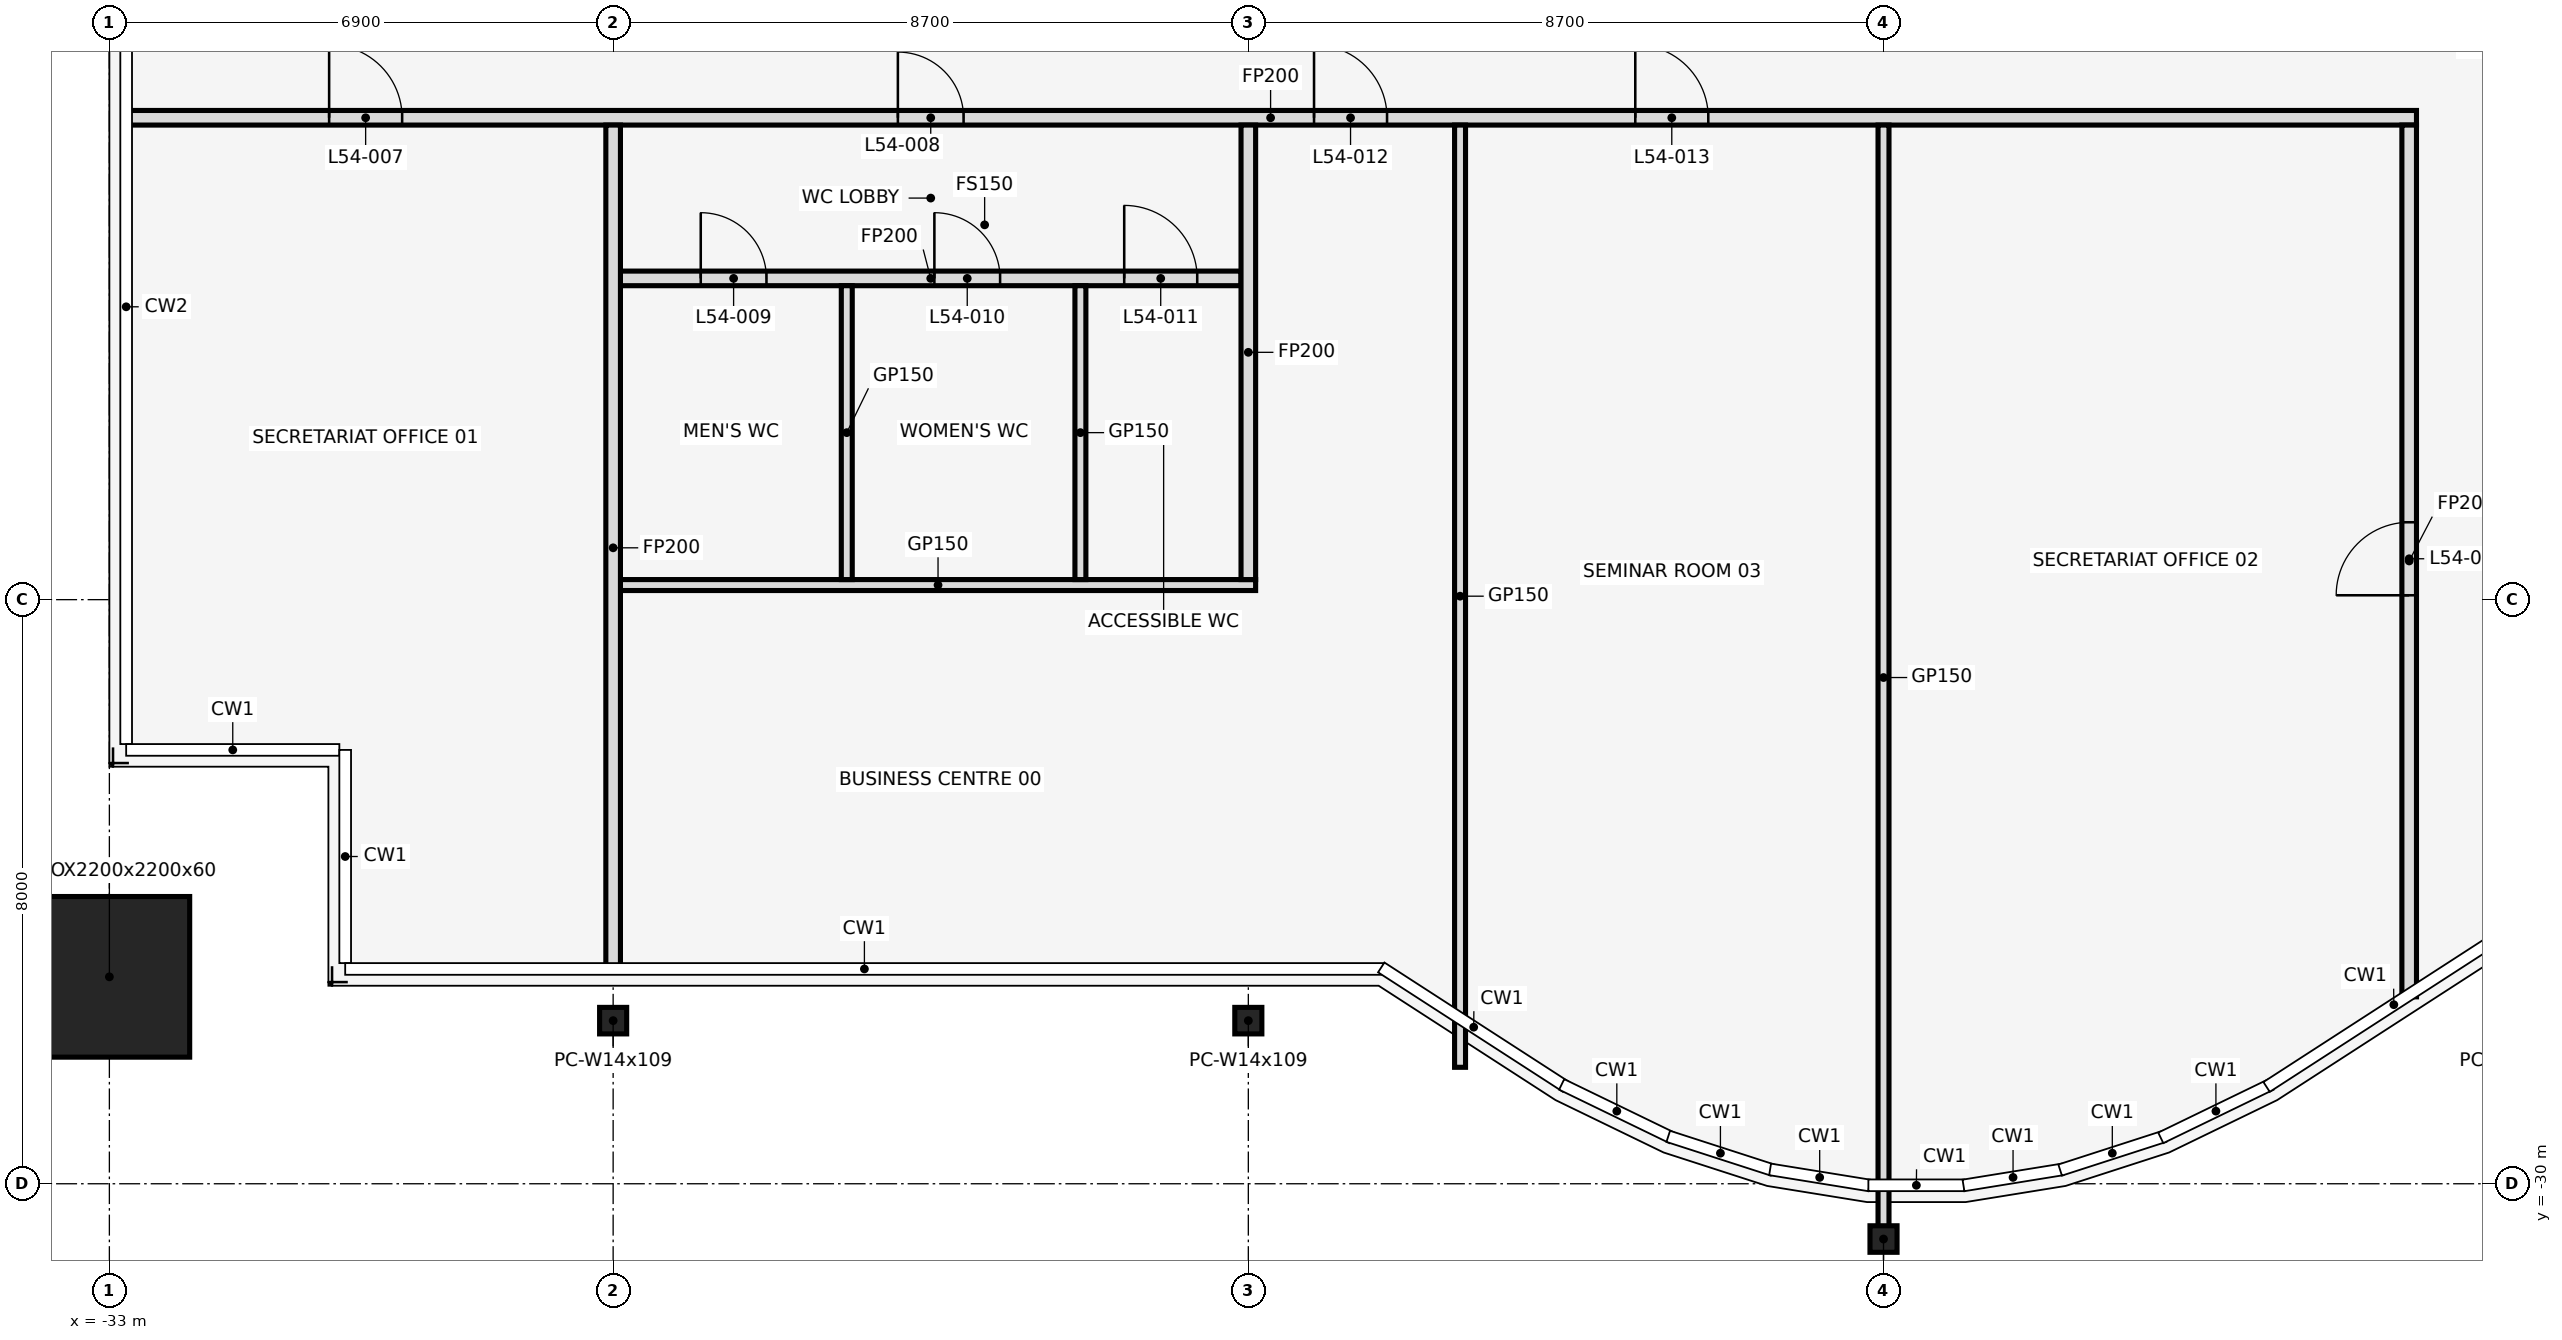
"""IFC4 building model, lengths in metres.
Left out: names, types, materials, properties, quantities, classifications, styles, units other than length and angle.
Written with IfcOpenShell. Run it as: python <this file> out.ifc"""

import sys

from ifc_helpers import new_model, si_unit, direction, frame, frame_2d, origin, origin_2d, place, context, subcontext, project, spatial, rectangle, hollow_rectangle, i_section, extrude, element, fill, save


model = new_model("IFC4")
c1 = context("Model", 3, precision=1e-05, world=origin(), true_north=direction((0.0, 1.0)))
c2 = subcontext(c1, "Body", "Model", "MODEL_VIEW")
j1 = project(units=[si_unit("LENGTHUNIT", "METRE"), si_unit("PLANEANGLEUNIT", "RADIAN")], contexts=[c1])
p1 = place(None, origin())
s1 = spatial("IfcSite", under=j1, at=p1, CompositionType="ELEMENT")
p2 = place(p1, origin())
s2 = spatial("IfcBuilding", under=s1, at=p2, CompositionType="ELEMENT")
p3 = place(p2, frame((0.0, 0.0, 241.4)))
s3 = spatial("IfcBuildingStorey", under=s2, at=p3, CompositionType="ELEMENT", Elevation=241.4)
p4 = place(p3, frame((-33.0, -27.166, 0.0), z_axis=(0.0, 0.0, 1.0), x_axis=(1.0, 0.0, 0.0)))
e1 = element("IfcColumn", 1, at=p4, inside=s3, PredefinedType="COLUMN", context=c2, shape_type="SweptSolid", body=[
    extrude(hollow_rectangle(XDim=2.2, YDim=2.2, WallThickness=0.06, at=origin_2d()), origin(), (0.0, 0.0, 1.0), 4.2),
])
for number, where, z_axis, x_axis in (
    (2, (-26.1, -27.766, 0.0), (0.0, 0.0, 1.0), (1.0, 0.0, 0.0)),
    (3, (-17.4, -27.766, 0.0), (0.0, 0.0, 1.0), (1.0, 0.0, 0.0)),
    (4, (-8.7, -30.757, 0.0), (0.0, 0.0, 1.0), (1.0, 0.0, 0.0)),
):
    element("IfcColumn", number, at=place(p3, frame(where, z_axis=z_axis, x_axis=x_axis)), inside=s3, PredefinedType="COLUMN", context=c2, shape_type="SweptSolid", body=[
        extrude(i_section(OverallWidth=0.371, OverallDepth=0.363, WebThickness=0.013, FlangeThickness=0.022, at=origin_2d()), origin(), (0.0, 0.0, 1.0), 4.2),
    ])
p5 = place(p3, frame((-26.0, -21.8, 0.0), z_axis=(0.0, 0.0, 1.0), x_axis=(1.0, 0.0, 0.0)))
e5 = element("IfcWall", 5, at=p5, inside=s3, PredefinedType="PARTITIONING", context=c2, shape_type="SweptSolid", body=[
    extrude(rectangle(XDim=8.7, YDim=0.15, at=frame_2d((4.35, 0.0))), origin(), (0.0, 0.0, 1.0), 3.118),
])
p6 = place(p3, frame((-26.0, -17.6, 0.0), z_axis=(0.0, 0.0, 1.0), x_axis=(1.0, 0.0, 0.0)))
e6 = element("IfcWall", 6, at=p6, inside=s3, PredefinedType="PARTITIONING", context=c2, shape_type="SweptSolid", body=[
    extrude(rectangle(XDim=8.5, YDim=0.2, at=frame_2d((4.25, 0.0))), origin(), (0.0, 0.0, 1.0), 3.118),
])
p7 = place(p6, frame((1.1, 0.0, 0.0)))
e7 = element("IfcOpeningElement", 7, at=p7, cuts=e6, PredefinedType="OPENING", context=c2, shape_type="SweptSolid", body=[
    extrude(rectangle(XDim=0.9, YDim=2.1, at=frame_2d((0.45, 1.05))), frame((0.0, 0.112, 0.0), z_axis=(0.0, -1.0, 0.0), x_axis=(1.0, 0.0, 0.0)), (0.0, 0.0, 1.0), 0.224),
])
p8 = place(p6, frame((4.3, 0.0, 0.0)))
e8 = element("IfcOpeningElement", 8, at=p8, cuts=e6, PredefinedType="OPENING", context=c2, shape_type="SweptSolid", body=[
    extrude(rectangle(XDim=0.9, YDim=2.1, at=frame_2d((0.45, 1.05))), frame((0.0, 0.112, 0.0), z_axis=(0.0, -1.0, 0.0), x_axis=(1.0, 0.0, 0.0)), (0.0, 0.0, 1.0), 0.224),
])
p9 = place(p6, frame((6.9, 0.0, 0.0)))
e9 = element("IfcOpeningElement", 9, at=p9, cuts=e6, PredefinedType="OPENING", context=c2, shape_type="SweptSolid", body=[
    extrude(rectangle(XDim=1.0, YDim=2.1, at=frame_2d((0.5, 1.05))), frame((0.0, 0.112, 0.0), z_axis=(0.0, -1.0, 0.0), x_axis=(1.0, 0.0, 0.0)), (0.0, 0.0, 1.0), 0.224),
])
p10 = place(p3, frame((-32.79, -15.4, 0.0), z_axis=(0.0, 0.0, 1.0), x_axis=(1.0, 0.0, 0.0)))
e10 = element("IfcWall", 10, at=p10, inside=s3, PredefinedType="PARTITIONING", context=c2, shape_type="SweptSolid", body=[
    extrude(rectangle(XDim=31.39, YDim=0.2, at=frame_2d((15.695, 0.0))), origin(), (0.0, 0.0, 1.0), 3.118),
])
p11 = place(p10, frame((2.8, 0.0, 0.0)))
e11 = element("IfcOpeningElement", 11, at=p11, cuts=e10, PredefinedType="OPENING", context=c2, shape_type="SweptSolid", body=[
    extrude(rectangle(XDim=1.0, YDim=2.1, at=frame_2d((0.5, 1.05))), frame((0.0, 0.112, 0.0), z_axis=(0.0, -1.0, 0.0), x_axis=(1.0, 0.0, 0.0)), (0.0, 0.0, 1.0), 0.224),
])
p12 = place(p10, frame((10.59, 0.0, 0.0)))
e12 = element("IfcOpeningElement", 12, at=p12, cuts=e10, PredefinedType="OPENING", context=c2, shape_type="SweptSolid", body=[
    extrude(rectangle(XDim=0.9, YDim=2.1, at=frame_2d((0.45, 1.05))), frame((0.0, 0.112, 0.0), z_axis=(0.0, -1.0, 0.0), x_axis=(1.0, 0.0, 0.0)), (0.0, 0.0, 1.0), 0.224),
])
p13 = place(p10, frame((16.29, 0.0, 0.0)))
e13 = element("IfcOpeningElement", 13, at=p13, cuts=e10, PredefinedType="OPENING", context=c2, shape_type="SweptSolid", body=[
    extrude(rectangle(XDim=1.0, YDim=2.1, at=frame_2d((0.5, 1.05))), frame((0.0, 0.112, 0.0), z_axis=(0.0, -1.0, 0.0), x_axis=(1.0, 0.0, 0.0)), (0.0, 0.0, 1.0), 0.224),
])
p14 = place(p10, frame((20.69, 0.0, 0.0)))
e14 = element("IfcOpeningElement", 14, at=p14, cuts=e10, PredefinedType="OPENING", context=c2, shape_type="SweptSolid", body=[
    extrude(rectangle(XDim=1.0, YDim=2.1, at=frame_2d((0.5, 1.05))), frame((0.0, 0.112, 0.0), z_axis=(0.0, -1.0, 0.0), x_axis=(1.0, 0.0, 0.0)), (0.0, 0.0, 1.0), 0.224),
])
p15 = place(p3, frame((-26.1, -27.08, 0.0), z_axis=(0.0, 0.0, 1.0), x_axis=(0.0, 1.0, 0.0)))
e15 = element("IfcWall", 15, at=p15, inside=s3, PredefinedType="PARTITIONING", context=c2, shape_type="SweptSolid", body=[
    extrude(rectangle(XDim=11.58, YDim=0.2, at=frame_2d((5.79, 0.0))), origin(), (0.0, 0.0, 1.0), 3.118),
])
for number, where, z_axis, x_axis in (
    (16, (-22.9, -21.725, 0.0), (0.0, 0.0, 1.0), (0.0, 1.0, 0.0)),
    (17, (-19.7, -21.725, 0.0), (0.0, 0.0, 1.0), (0.0, 1.0, 0.0)),
):
    element("IfcWall", number, at=place(p3, frame(where, z_axis=z_axis, x_axis=x_axis)), inside=s3, PredefinedType="PARTITIONING", context=c2, shape_type="SweptSolid", body=[
        extrude(rectangle(XDim=4.025, YDim=0.15, at=frame_2d((2.013, 0.0))), origin(), (0.0, 0.0, 1.0), 3.118),
    ])
p16 = place(p3, frame((-17.4, -21.725, 0.0), z_axis=(0.0, 0.0, 1.0), x_axis=(0.0, 1.0, 0.0)))
e18 = element("IfcWall", 18, at=p16, inside=s3, PredefinedType="PARTITIONING", context=c2, shape_type="SweptSolid", body=[
    extrude(rectangle(XDim=6.225, YDim=0.2, at=frame_2d((3.113, 0.0))), origin(), (0.0, 0.0, 1.0), 3.118),
])
p17 = place(p3, frame((-14.5, -28.405, 0.0), z_axis=(0.0, 0.0, 1.0), x_axis=(0.0, 1.0, 0.0)))
e19 = element("IfcWall", 19, at=p17, inside=s3, PredefinedType="PARTITIONING", context=c2, shape_type="SweptSolid", body=[
    extrude(rectangle(XDim=12.905, YDim=0.15, at=frame_2d((6.453, 0.0))), origin(), (0.0, 0.0, 1.0), 3.118),
])
p18 = place(p3, frame((-8.7, -30.633, 0.0), z_axis=(0.0, 0.0, 1.0), x_axis=(0.0, 1.0, 0.0)))
e20 = element("IfcWall", 20, at=p18, inside=s3, PredefinedType="PARTITIONING", context=c2, shape_type="SweptSolid", body=[
    extrude(rectangle(XDim=15.133, YDim=0.15, at=frame_2d((7.567, 0.0))), origin(), (0.0, 0.0, 1.0), 3.118),
])
p19 = place(p3, frame((-1.5, -27.44, 0.0), z_axis=(0.0, 0.0, 1.0), x_axis=(0.0, 1.0, 0.0)))
e21 = element("IfcWall", 21, at=p19, inside=s3, PredefinedType="PARTITIONING", context=c2, shape_type="SweptSolid", body=[
    extrude(rectangle(XDim=11.94, YDim=0.2, at=frame_2d((5.97, 0.0))), origin(), (0.0, 0.0, 1.0), 3.118),
])
p20 = place(p19, frame((5.5, 0.0, 0.0)))
e22 = element("IfcOpeningElement", 22, at=p20, cuts=e21, PredefinedType="OPENING", context=c2, shape_type="SweptSolid", body=[
    extrude(rectangle(XDim=1.0, YDim=2.1, at=frame_2d((0.5, 1.05))), frame((0.0, 0.112, 0.0), z_axis=(0.0, -1.0, 0.0), x_axis=(1.0, 0.0, 0.0)), (0.0, 0.0, 1.0), 0.224),
])
p21 = place(p11, frame((1.0, 0.0, 0.0), z_axis=(0.0, 0.0, 1.0), x_axis=(-1.0, 0.0, 0.0)))
e23 = element("IfcDoor", 23, at=p21, inside=s3, OperationType="SINGLE_SWING_LEFT", PredefinedType="DOOR", context=c2, shape_type="SweptSolid", body=[
    extrude(rectangle(XDim=1.0, YDim=2.1, at=frame_2d((0.5, 1.05))), frame((0.0, 0.025, 0.0), z_axis=(0.0, -1.0, 0.0), x_axis=(1.0, 0.0, 0.0)), (0.0, 0.0, 1.0), 0.05),
])
fill(e11, e23)
p22 = place(p12, frame((0.9, 0.0, 0.0), z_axis=(0.0, 0.0, 1.0), x_axis=(-1.0, 0.0, 0.0)))
e24 = element("IfcDoor", 24, at=p22, inside=s3, OperationType="SINGLE_SWING_RIGHT", PredefinedType="DOOR", context=c2, shape_type="SweptSolid", body=[
    extrude(rectangle(XDim=0.9, YDim=2.1, at=frame_2d((0.45, 1.05))), frame((0.0, 0.025, 0.0), z_axis=(0.0, -1.0, 0.0), x_axis=(1.0, 0.0, 0.0)), (0.0, 0.0, 1.0), 0.05),
])
fill(e12, e24)
p23 = place(p7, frame((0.9, 0.0, 0.0), z_axis=(0.0, 0.0, 1.0), x_axis=(-1.0, 0.0, 0.0)))
e25 = element("IfcDoor", 25, at=p23, inside=s3, OperationType="SINGLE_SWING_RIGHT", PredefinedType="DOOR", context=c2, shape_type="SweptSolid", body=[
    extrude(rectangle(XDim=0.9, YDim=2.1, at=frame_2d((0.45, 1.05))), frame((0.0, 0.025, 0.0), z_axis=(0.0, -1.0, 0.0), x_axis=(1.0, 0.0, 0.0)), (0.0, 0.0, 1.0), 0.05),
])
fill(e7, e25)
p24 = place(p8, frame((0.9, 0.0, 0.0), z_axis=(0.0, 0.0, 1.0), x_axis=(-1.0, 0.0, 0.0)))
e26 = element("IfcDoor", 26, at=p24, inside=s3, OperationType="SINGLE_SWING_LEFT", PredefinedType="DOOR", context=c2, shape_type="SweptSolid", body=[
    extrude(rectangle(XDim=0.9, YDim=2.1, at=frame_2d((0.45, 1.05))), frame((0.0, 0.025, 0.0), z_axis=(0.0, -1.0, 0.0), x_axis=(1.0, 0.0, 0.0)), (0.0, 0.0, 1.0), 0.05),
])
fill(e8, e26)
p25 = place(p9, frame((1.0, 0.0, 0.0), z_axis=(0.0, 0.0, 1.0), x_axis=(-1.0, 0.0, 0.0)))
e27 = element("IfcDoor", 27, at=p25, inside=s3, OperationType="SINGLE_SWING_RIGHT", PredefinedType="DOOR", context=c2, shape_type="SweptSolid", body=[
    extrude(rectangle(XDim=1.0, YDim=2.1, at=frame_2d((0.5, 1.05))), frame((0.0, 0.025, 0.0), z_axis=(0.0, -1.0, 0.0), x_axis=(1.0, 0.0, 0.0)), (0.0, 0.0, 1.0), 0.05),
])
fill(e9, e27)
p26 = place(p13, frame((1.0, 0.0, 0.0), z_axis=(0.0, 0.0, 1.0), x_axis=(-1.0, 0.0, 0.0)))
e28 = element("IfcDoor", 28, at=p26, inside=s3, OperationType="SINGLE_SWING_RIGHT", PredefinedType="DOOR", context=c2, shape_type="SweptSolid", body=[
    extrude(rectangle(XDim=1.0, YDim=2.1, at=frame_2d((0.5, 1.05))), frame((0.0, 0.025, 0.0), z_axis=(0.0, -1.0, 0.0), x_axis=(1.0, 0.0, 0.0)), (0.0, 0.0, 1.0), 0.05),
])
fill(e13, e28)
p27 = place(p14, frame((1.0, 0.0, 0.0), z_axis=(0.0, 0.0, 1.0), x_axis=(-1.0, 0.0, 0.0)))
e29 = element("IfcDoor", 29, at=p27, inside=s3, OperationType="SINGLE_SWING_LEFT", PredefinedType="DOOR", context=c2, shape_type="SweptSolid", body=[
    extrude(rectangle(XDim=1.0, YDim=2.1, at=frame_2d((0.5, 1.05))), frame((0.0, 0.025, 0.0), z_axis=(0.0, -1.0, 0.0), x_axis=(1.0, 0.0, 0.0)), (0.0, 0.0, 1.0), 0.05),
])
fill(e14, e29)
p28 = place(p20, origin())
e30 = element("IfcDoor", 30, at=p28, inside=s3, OperationType="SINGLE_SWING_LEFT", PredefinedType="DOOR", context=c2, shape_type="SweptSolid", body=[
    extrude(rectangle(XDim=1.0, YDim=2.1, at=frame_2d((0.5, 1.05))), frame((0.0, 0.025, 0.0), z_axis=(0.0, -1.0, 0.0), x_axis=(1.0, 0.0, 0.0)), (0.0, 0.0, 1.0), 0.05),
])
fill(e22, e30)
save(model, sys.argv[1])
